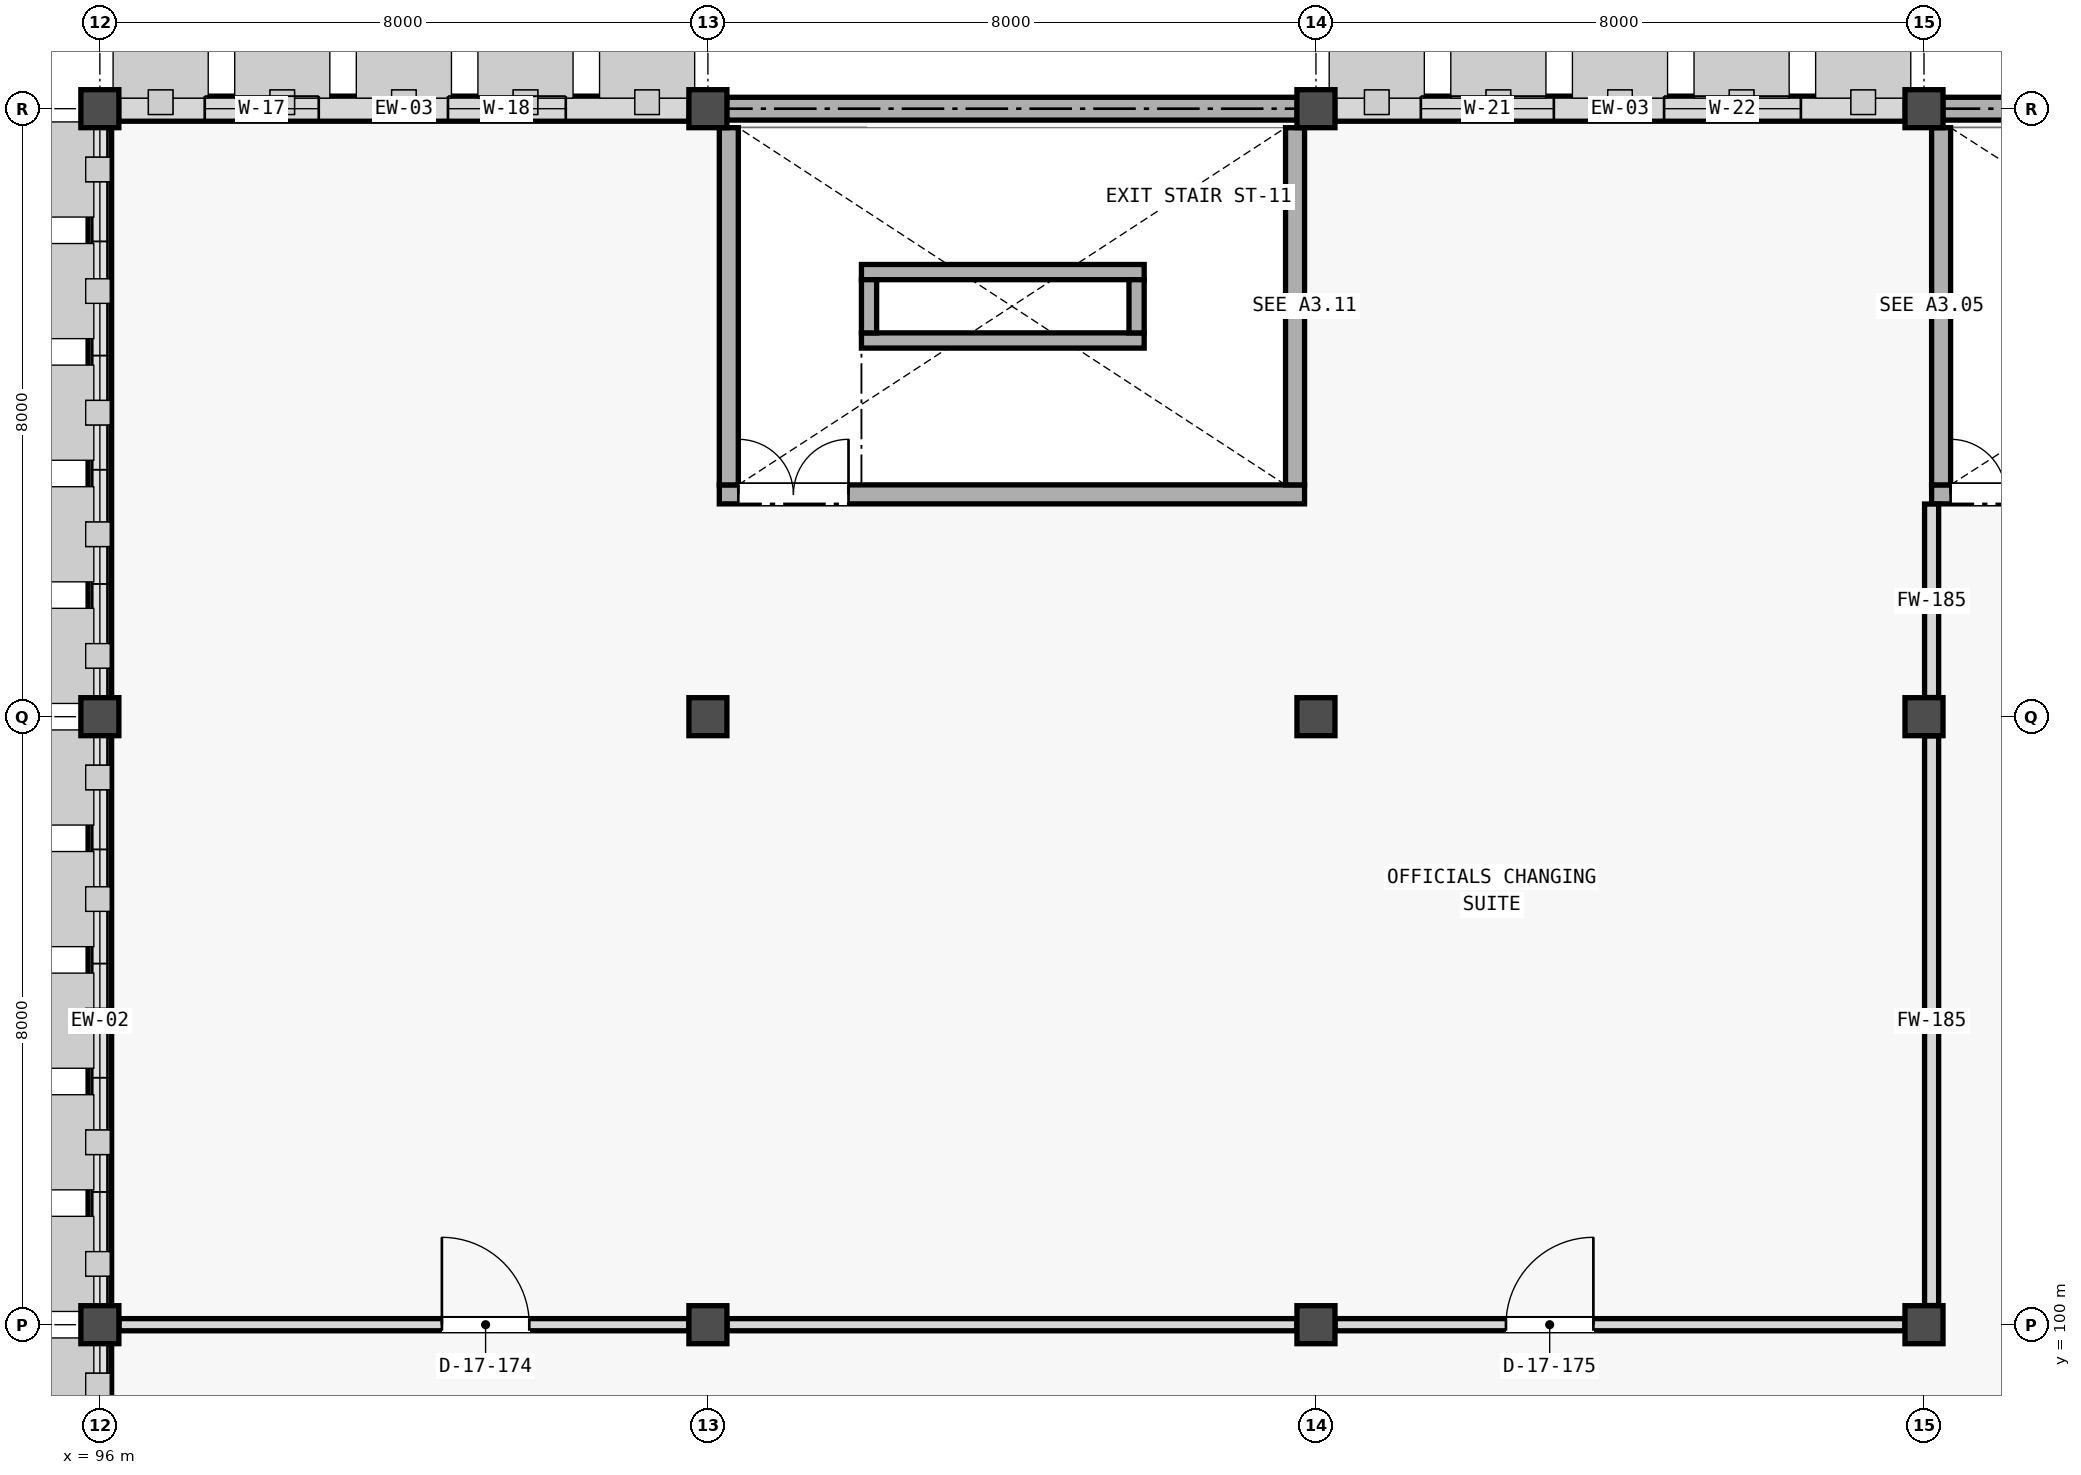
"""IFC4 building model, lengths in metres.
Left out: names, types, materials, properties, quantities, classifications, styles, units other than length and angle.
Written with IfcOpenShell. Run it as: python <this file> out.ifc"""

import sys

from ifc_helpers import new_model, si_unit, direction, frame, frame_2d, origin, origin_2d, place, context, subcontext, project, spatial, rectangle, extrude, element, fill, save


model = new_model("IFC4")
c1 = context("Model", 3, precision=1e-05, world=origin(), true_north=direction((0.0, 1.0)))
c2 = subcontext(c1, "Body", "Model", "MODEL_VIEW")
j1 = project(units=[si_unit("LENGTHUNIT", "METRE"), si_unit("PLANEANGLEUNIT", "RADIAN")], contexts=[c1])
p1 = place(None, origin())
s1 = spatial("IfcSite", under=j1, at=p1, CompositionType="ELEMENT")
p2 = place(p1, origin())
s2 = spatial("IfcBuilding", under=s1, at=p2, CompositionType="ELEMENT")
p3 = place(p2, frame((0.0, 0.0, 5.4)))
s3 = spatial("IfcBuildingStorey", under=s2, at=p3, CompositionType="ELEMENT", Elevation=5.4)
for number, where, z_axis, x_axis in (
    (1, (96.0, 100.0, 0.0), (0.0, 0.0, 1.0), (1.0, 0.0, 0.0)),
    (2, (96.0, 108.0, 0.0), (0.0, 0.0, 1.0), (1.0, 0.0, 0.0)),
):
    element("IfcColumn", number, at=place(p3, frame(where, z_axis=z_axis, x_axis=x_axis)), inside=s3, PredefinedType="COLUMN", context=c2, shape_type="SweptSolid", body=[
        extrude(rectangle(XDim=0.5, YDim=0.5, at=origin_2d()), origin(), (0.0, 0.0, 1.0), 4.57),
    ])
p4 = place(p3, frame((96.0, 116.0, 0.0), z_axis=(0.0, 0.0, 1.0), x_axis=(1.0, 0.0, 0.0)))
e3 = element("IfcColumn", 3, at=p4, inside=s3, PredefinedType="COLUMN", context=c2, shape_type="SweptSolid", body=[
    extrude(rectangle(XDim=0.5, YDim=0.5, at=origin_2d()), origin(), (0.0, 0.0, 1.0), 4.55),
])
for number, where, z_axis, x_axis in (
    (4, (104.0, 100.0, 0.0), (0.0, 0.0, 1.0), (1.0, 0.0, 0.0)),
    (5, (104.0, 108.0, 0.0), (0.0, 0.0, 1.0), (1.0, 0.0, 0.0)),
):
    element("IfcColumn", number, at=place(p3, frame(where, z_axis=z_axis, x_axis=x_axis)), inside=s3, PredefinedType="COLUMN", context=c2, shape_type="SweptSolid", body=[
        extrude(rectangle(XDim=0.5, YDim=0.5, at=origin_2d()), origin(), (0.0, 0.0, 1.0), 4.57),
    ])
p5 = place(p3, frame((104.0, 116.0, 0.0), z_axis=(0.0, 0.0, 1.0), x_axis=(1.0, 0.0, 0.0)))
e6 = element("IfcColumn", 6, at=p5, inside=s3, PredefinedType="COLUMN", context=c2, shape_type="SweptSolid", body=[
    extrude(rectangle(XDim=0.5, YDim=0.5, at=origin_2d()), origin(), (0.0, 0.0, 1.0), 4.55),
])
for number, where, z_axis, x_axis in (
    (7, (112.0, 100.0, 0.0), (0.0, 0.0, 1.0), (1.0, 0.0, 0.0)),
    (8, (112.0, 108.0, 0.0), (0.0, 0.0, 1.0), (1.0, 0.0, 0.0)),
):
    element("IfcColumn", number, at=place(p3, frame(where, z_axis=z_axis, x_axis=x_axis)), inside=s3, PredefinedType="COLUMN", context=c2, shape_type="SweptSolid", body=[
        extrude(rectangle(XDim=0.5, YDim=0.5, at=origin_2d()), origin(), (0.0, 0.0, 1.0), 4.57),
    ])
p6 = place(p3, frame((112.0, 116.0, 0.0), z_axis=(0.0, 0.0, 1.0), x_axis=(1.0, 0.0, 0.0)))
e9 = element("IfcColumn", 9, at=p6, inside=s3, PredefinedType="COLUMN", context=c2, shape_type="SweptSolid", body=[
    extrude(rectangle(XDim=0.5, YDim=0.5, at=origin_2d()), origin(), (0.0, 0.0, 1.0), 4.55),
])
for number, where, z_axis, x_axis in (
    (10, (120.0, 100.0, 0.0), (0.0, 0.0, 1.0), (1.0, 0.0, 0.0)),
    (11, (120.0, 108.0, 0.0), (0.0, 0.0, 1.0), (1.0, 0.0, 0.0)),
):
    element("IfcColumn", number, at=place(p3, frame(where, z_axis=z_axis, x_axis=x_axis)), inside=s3, PredefinedType="COLUMN", context=c2, shape_type="SweptSolid", body=[
        extrude(rectangle(XDim=0.5, YDim=0.5, at=origin_2d()), origin(), (0.0, 0.0, 1.0), 4.57),
    ])
p7 = place(p3, frame((120.0, 116.0, 0.0), z_axis=(0.0, 0.0, 1.0), x_axis=(1.0, 0.0, 0.0)))
e12 = element("IfcColumn", 12, at=p7, inside=s3, PredefinedType="COLUMN", context=c2, shape_type="SweptSolid", body=[
    extrude(rectangle(XDim=0.5, YDim=0.5, at=origin_2d()), origin(), (0.0, 0.0, 1.0), 4.585),
])
p8 = place(p3, frame((96.246, 116.0, 0.0), z_axis=(0.0, 0.0, 1.0), x_axis=(1.0, 0.0, 0.0)))
e13 = element("IfcWall", 13, at=p8, inside=s3, PredefinedType="STANDARD", context=c2, shape_type="SweptSolid", body=[
    extrude(rectangle(XDim=7.508, YDim=0.33, at=frame_2d((3.754, 0.0))), origin(), (0.0, 0.0, 1.0), 3.7),
])
p9 = place(p8, frame((1.134, 0.0, 1.45)))
e14 = element("IfcOpeningElement", 14, at=p9, cuts=e13, PredefinedType="OPENING", context=c2, shape_type="SweptSolid", body=[
    extrude(rectangle(XDim=1.5, YDim=1.75, at=frame_2d((0.75, 0.875))), frame((0.0, 0.175, 0.0), z_axis=(0.0, -1.0, 0.0), x_axis=(1.0, 0.0, 0.0)), (0.0, 0.0, 1.0), 0.35),
])
p10 = place(p8, frame((4.334, 0.0, 1.45)))
e15 = element("IfcOpeningElement", 15, at=p10, cuts=e13, PredefinedType="OPENING", context=c2, shape_type="SweptSolid", body=[
    extrude(rectangle(XDim=1.55, YDim=1.95, at=frame_2d((0.775, 0.975))), frame((0.0, 0.175, 0.0), z_axis=(0.0, -1.0, 0.0), x_axis=(1.0, 0.0, 0.0)), (0.0, 0.0, 1.0), 0.35),
])
p11 = place(p3, frame((104.246, 116.0, 0.0), z_axis=(0.0, 0.0, 1.0), x_axis=(1.0, 0.0, 0.0)))
e16 = element("IfcWall", 16, at=p11, inside=s3, PredefinedType="SHEAR", context=c2, shape_type="SweptSolid", body=[
    extrude(rectangle(XDim=7.508, YDim=0.3, at=frame_2d((3.754, 0.0))), origin(), (0.0, 0.0, 1.0), 4.8),
])
p12 = place(p3, frame((112.246, 116.0, 0.0), z_axis=(0.0, 0.0, 1.0), x_axis=(1.0, 0.0, 0.0)))
e17 = element("IfcWall", 17, at=p12, inside=s3, PredefinedType="STANDARD", context=c2, shape_type="SweptSolid", body=[
    extrude(rectangle(XDim=7.508, YDim=0.33, at=frame_2d((3.754, 0.0))), origin(), (0.0, 0.0, 1.0), 3.7),
])
p13 = place(p12, frame((1.134, 0.0, 1.45)))
e18 = element("IfcOpeningElement", 18, at=p13, cuts=e17, PredefinedType="OPENING", context=c2, shape_type="SweptSolid", body=[
    extrude(rectangle(XDim=1.75, YDim=1.55, at=frame_2d((0.875, 0.775))), frame((0.0, 0.175, 0.0), z_axis=(0.0, -1.0, 0.0), x_axis=(1.0, 0.0, 0.0)), (0.0, 0.0, 1.0), 0.35),
])
p14 = place(p12, frame((4.334, 0.0, 1.45)))
e19 = element("IfcOpeningElement", 19, at=p14, cuts=e17, PredefinedType="OPENING", context=c2, shape_type="SweptSolid", body=[
    extrude(rectangle(XDim=1.8, YDim=1.8, at=frame_2d((0.9, 0.9))), frame((0.0, 0.175, 0.0), z_axis=(0.0, -1.0, 0.0), x_axis=(1.0, 0.0, 0.0)), (0.0, 0.0, 1.0), 0.35),
])
p15 = place(p3, frame((120.246, 116.0, 0.0), z_axis=(0.0, 0.0, 1.0), x_axis=(1.0, 0.0, 0.0)))
e20 = element("IfcWall", 20, at=p15, inside=s3, PredefinedType="SHEAR", context=c2, shape_type="SweptSolid", body=[
    extrude(rectangle(XDim=7.508, YDim=0.3, at=frame_2d((3.754, 0.0))), origin(), (0.0, 0.0, 1.0), 4.8),
])
for number, where, z_axis, x_axis in (
    (21, (96.0, 92.246, 0.0), (0.0, 0.0, 1.0), (0.0, 1.0, 0.0)),
    (22, (96.0, 100.246, 0.0), (0.0, 0.0, 1.0), (0.0, 1.0, 0.0)),
    (23, (96.0, 108.246, 0.0), (0.0, 0.0, 1.0), (0.0, 1.0, 0.0)),
):
    element("IfcWall", number, at=place(p3, frame(where, z_axis=z_axis, x_axis=x_axis)), inside=s3, PredefinedType="STANDARD", context=c2, shape_type="SweptSolid", body=[
        extrude(rectangle(XDim=7.508, YDim=0.31, at=frame_2d((3.754, 0.0))), origin(), (0.0, 0.0, 1.0), 1.25),
    ])
p16 = place(p3, frame((120.1, 110.925, 0.0), z_axis=(0.0, 0.0, 1.0), x_axis=(1.0, 0.0, 0.0)))
e24 = element("IfcWall", 24, at=p16, inside=s3, PredefinedType="SHEAR", context=c2, shape_type="SweptSolid", body=[
    extrude(rectangle(XDim=7.8, YDim=0.25, at=frame_2d((3.9, 0.0))), origin(), (0.0, 0.0, 1.0), 4.8),
])
p17 = place(p16, frame((0.25, 0.0, 0.0)))
e25 = element("IfcOpeningElement", 25, at=p17, cuts=e24, PredefinedType="OPENING", context=c2, shape_type="SweptSolid", body=[
    extrude(rectangle(XDim=1.45, YDim=2.2, at=frame_2d((0.725, 1.1))), frame((0.0, 0.135, 0.0), z_axis=(0.0, -1.0, 0.0), x_axis=(1.0, 0.0, 0.0)), (0.0, 0.0, 1.0), 0.27),
])
p18 = place(p3, frame((120.225, 111.05, 0.0), z_axis=(0.0, 0.0, 1.0), x_axis=(0.0, 1.0, 0.0)))
e26 = element("IfcWall", 26, at=p18, inside=s3, PredefinedType="SHEAR", context=c2, shape_type="SweptSolid", body=[
    extrude(rectangle(XDim=4.7, YDim=0.25, at=frame_2d((2.35, 0.0))), origin(), (0.0, 0.0, 1.0), 4.8),
])
p19 = place(p3, frame((104.15, 110.925, 0.0), z_axis=(0.0, 0.0, 1.0), x_axis=(1.0, 0.0, 0.0)))
e27 = element("IfcWall", 27, at=p19, inside=s3, PredefinedType="SHEAR", context=c2, shape_type="SweptSolid", body=[
    extrude(rectangle(XDim=7.7, YDim=0.25, at=frame_2d((3.85, 0.0))), origin(), (0.0, 0.0, 1.0), 4.55),
])
p20 = place(p19, frame((0.25, 0.0, 0.0)))
e28 = element("IfcOpeningElement", 28, at=p20, cuts=e27, PredefinedType="OPENING", context=c2, shape_type="SweptSolid", body=[
    extrude(rectangle(XDim=1.45, YDim=2.2, at=frame_2d((0.725, 1.1))), frame((0.0, 0.135, 0.0), z_axis=(0.0, -1.0, 0.0), x_axis=(1.0, 0.0, 0.0)), (0.0, 0.0, 1.0), 0.27),
])
for number, where, z_axis, x_axis in (
    (29, (104.275, 111.05, 0.0), (0.0, 0.0, 1.0), (0.0, 1.0, 0.0)),
    (30, (111.725, 111.05, 0.0), (0.0, 0.0, 1.0), (0.0, 1.0, 0.0)),
):
    element("IfcWall", number, at=place(p3, frame(where, z_axis=z_axis, x_axis=x_axis)), inside=s3, PredefinedType="SHEAR", context=c2, shape_type="SweptSolid", body=[
        extrude(rectangle(XDim=4.7, YDim=0.25, at=frame_2d((2.35, 0.0))), origin(), (0.0, 0.0, 1.0), 4.55),
    ])
for number, where, z_axis, x_axis in (
    (31, (106.02, 112.95, 0.0), (0.0, 0.0, 1.0), (1.0, 0.0, 0.0)),
    (32, (106.02, 113.85, 0.0), (0.0, 0.0, 1.0), (1.0, 0.0, 0.0)),
):
    element("IfcWall", number, at=place(p3, frame(where, z_axis=z_axis, x_axis=x_axis)), inside=s3, PredefinedType="SHEAR", context=c2, shape_type="SweptSolid", body=[
        extrude(rectangle(XDim=3.72, YDim=0.2, at=frame_2d((1.86, 0.0))), origin(), (0.0, 0.0, 1.0), 4.55),
    ])
for number, where, z_axis, x_axis in (
    (33, (106.12, 113.05, 0.0), (0.0, 0.0, 1.0), (0.0, 1.0, 0.0)),
    (34, (109.64, 113.05, 0.0), (0.0, 0.0, 1.0), (0.0, 1.0, 0.0)),
):
    element("IfcWall", number, at=place(p3, frame(where, z_axis=z_axis, x_axis=x_axis)), inside=s3, PredefinedType="SHEAR", context=c2, shape_type="SweptSolid", body=[
        extrude(rectangle(XDim=0.7, YDim=0.2, at=frame_2d((0.35, 0.0))), origin(), (0.0, 0.0, 1.0), 4.55),
    ])
p21 = place(p3, frame((96.252, 100.0, 0.0), z_axis=(0.0, 0.0, 1.0), x_axis=(1.0, 0.0, 0.0)))
e35 = element("IfcWall", 35, at=p21, inside=s3, PredefinedType="PARTITIONING", context=c2, shape_type="SweptSolid", body=[
    extrude(rectangle(XDim=7.496, YDim=0.16, at=frame_2d((3.748, 0.0))), origin(), (0.0, 0.0, 1.0), 3.78),
])
p22 = place(p21, frame((4.248, 0.0, 0.0)))
e36 = element("IfcOpeningElement", 36, at=p22, cuts=e35, PredefinedType="OPENING", context=c2, shape_type="SweptSolid", body=[
    extrude(rectangle(XDim=1.15, YDim=2.15, at=frame_2d((0.575, 1.075))), frame((0.0, 0.09, 0.0), z_axis=(0.0, -1.0, 0.0), x_axis=(1.0, 0.0, 0.0)), (0.0, 0.0, 1.0), 0.18),
])
p23 = place(p3, frame((104.252, 100.0, 0.0), z_axis=(0.0, 0.0, 1.0), x_axis=(1.0, 0.0, 0.0)))
e37 = element("IfcWall", 37, at=p23, inside=s3, PredefinedType="PARTITIONING", context=c2, shape_type="SweptSolid", body=[
    extrude(rectangle(XDim=7.496, YDim=0.16, at=frame_2d((3.748, 0.0))), origin(), (0.0, 0.0, 1.0), 3.78),
])
p24 = place(p3, frame((112.252, 100.0, 0.0), z_axis=(0.0, 0.0, 1.0), x_axis=(1.0, 0.0, 0.0)))
e38 = element("IfcWall", 38, at=p24, inside=s3, PredefinedType="PARTITIONING", context=c2, shape_type="SweptSolid", body=[
    extrude(rectangle(XDim=7.496, YDim=0.16, at=frame_2d((3.748, 0.0))), origin(), (0.0, 0.0, 1.0), 3.78),
])
p25 = place(p24, frame((2.248, 0.0, 0.0)))
e39 = element("IfcOpeningElement", 39, at=p25, cuts=e38, PredefinedType="OPENING", context=c2, shape_type="SweptSolid", body=[
    extrude(rectangle(XDim=1.15, YDim=2.15, at=frame_2d((0.575, 1.075))), frame((0.0, 0.09, 0.0), z_axis=(0.0, -1.0, 0.0), x_axis=(1.0, 0.0, 0.0)), (0.0, 0.0, 1.0), 0.18),
])
p26 = place(p3, frame((120.1, 100.252, 0.0), z_axis=(0.0, 0.0, 1.0), x_axis=(0.0, 1.0, 0.0)))
e40 = element("IfcWall", 40, at=p26, inside=s3, PredefinedType="STANDARD", context=c2, shape_type="SweptSolid", body=[
    extrude(rectangle(XDim=7.496, YDim=0.185, at=frame_2d((3.748, 0.0))), origin(), (0.0, 0.0, 1.0), 3.83),
])
p27 = place(p3, frame((120.1, 108.252, 0.0), z_axis=(0.0, 0.0, 1.0), x_axis=(0.0, 1.0, 0.0)))
e41 = element("IfcWall", 41, at=p27, inside=s3, PredefinedType="STANDARD", context=c2, shape_type="SweptSolid", body=[
    extrude(rectangle(XDim=2.546, YDim=0.185, at=frame_2d((1.273, 0.0))), origin(), (0.0, 0.0, 1.0), 3.83),
])
p28 = place(p9, origin())
e42 = element("IfcWindow", 42, at=p28, inside=s3, PartitioningType="SINGLE_PANEL", PredefinedType="WINDOW", context=c2, shape_type="SweptSolid", body=[
    extrude(rectangle(XDim=1.5, YDim=1.75, at=frame_2d((0.75, 0.875))), frame((0.0, 0.03, 0.0), z_axis=(0.0, -1.0, 0.0), x_axis=(1.0, 0.0, 0.0)), (0.0, 0.0, 1.0), 0.06),
])
fill(e14, e42)
p29 = place(p10, origin())
e43 = element("IfcWindow", 43, at=p29, inside=s3, PartitioningType="SINGLE_PANEL", PredefinedType="WINDOW", context=c2, shape_type="SweptSolid", body=[
    extrude(rectangle(XDim=1.55, YDim=1.95, at=frame_2d((0.775, 0.975))), frame((0.0, 0.03, 0.0), z_axis=(0.0, -1.0, 0.0), x_axis=(1.0, 0.0, 0.0)), (0.0, 0.0, 1.0), 0.06),
])
fill(e15, e43)
p30 = place(p13, origin())
e44 = element("IfcWindow", 44, at=p30, inside=s3, PartitioningType="SINGLE_PANEL", PredefinedType="WINDOW", context=c2, shape_type="SweptSolid", body=[
    extrude(rectangle(XDim=1.75, YDim=1.55, at=frame_2d((0.875, 0.775))), frame((0.0, 0.03, 0.0), z_axis=(0.0, -1.0, 0.0), x_axis=(1.0, 0.0, 0.0)), (0.0, 0.0, 1.0), 0.06),
])
fill(e18, e44)
p31 = place(p14, origin())
e45 = element("IfcWindow", 45, at=p31, inside=s3, PartitioningType="SINGLE_PANEL", PredefinedType="WINDOW", context=c2, shape_type="SweptSolid", body=[
    extrude(rectangle(XDim=1.8, YDim=1.8, at=frame_2d((0.9, 0.9))), frame((0.0, 0.03, 0.0), z_axis=(0.0, -1.0, 0.0), x_axis=(1.0, 0.0, 0.0)), (0.0, 0.0, 1.0), 0.06),
])
fill(e19, e45)
p32 = place(p17, origin())
e46 = element("IfcDoor", 46, at=p32, inside=s3, OperationType="DOUBLE_DOOR_SINGLE_SWING", PredefinedType="DOOR", context=c2, shape_type="SweptSolid", body=[
    extrude(rectangle(XDim=1.45, YDim=2.2, at=frame_2d((0.725, 1.1))), frame((0.0, 0.025, 0.0), z_axis=(0.0, -1.0, 0.0), x_axis=(1.0, 0.0, 0.0)), (0.0, 0.0, 1.0), 0.05),
])
fill(e25, e46)
p33 = place(p20, origin())
e47 = element("IfcDoor", 47, at=p33, inside=s3, OperationType="DOUBLE_DOOR_SINGLE_SWING", PredefinedType="DOOR", context=c2, shape_type="SweptSolid", body=[
    extrude(rectangle(XDim=1.45, YDim=2.2, at=frame_2d((0.725, 1.1))), frame((0.0, 0.025, 0.0), z_axis=(0.0, -1.0, 0.0), x_axis=(1.0, 0.0, 0.0)), (0.0, 0.0, 1.0), 0.05),
])
fill(e28, e47)
p34 = place(p22, origin())
e48 = element("IfcDoor", 48, at=p34, inside=s3, OperationType="SINGLE_SWING_LEFT", PredefinedType="DOOR", context=c2, shape_type="SweptSolid", body=[
    extrude(rectangle(XDim=1.15, YDim=2.15, at=frame_2d((0.575, 1.075))), frame((0.0, 0.025, 0.0), z_axis=(0.0, -1.0, 0.0), x_axis=(1.0, 0.0, 0.0)), (0.0, 0.0, 1.0), 0.05),
])
fill(e36, e48)
p35 = place(p25, origin())
e49 = element("IfcDoor", 49, at=p35, inside=s3, OperationType="SINGLE_SWING_RIGHT", PredefinedType="DOOR", context=c2, shape_type="SweptSolid", body=[
    extrude(rectangle(XDim=1.15, YDim=2.15, at=frame_2d((0.575, 1.075))), frame((0.0, 0.025, 0.0), z_axis=(0.0, -1.0, 0.0), x_axis=(1.0, 0.0, 0.0)), (0.0, 0.0, 1.0), 0.05),
])
fill(e39, e49)
save(model, sys.argv[1])
